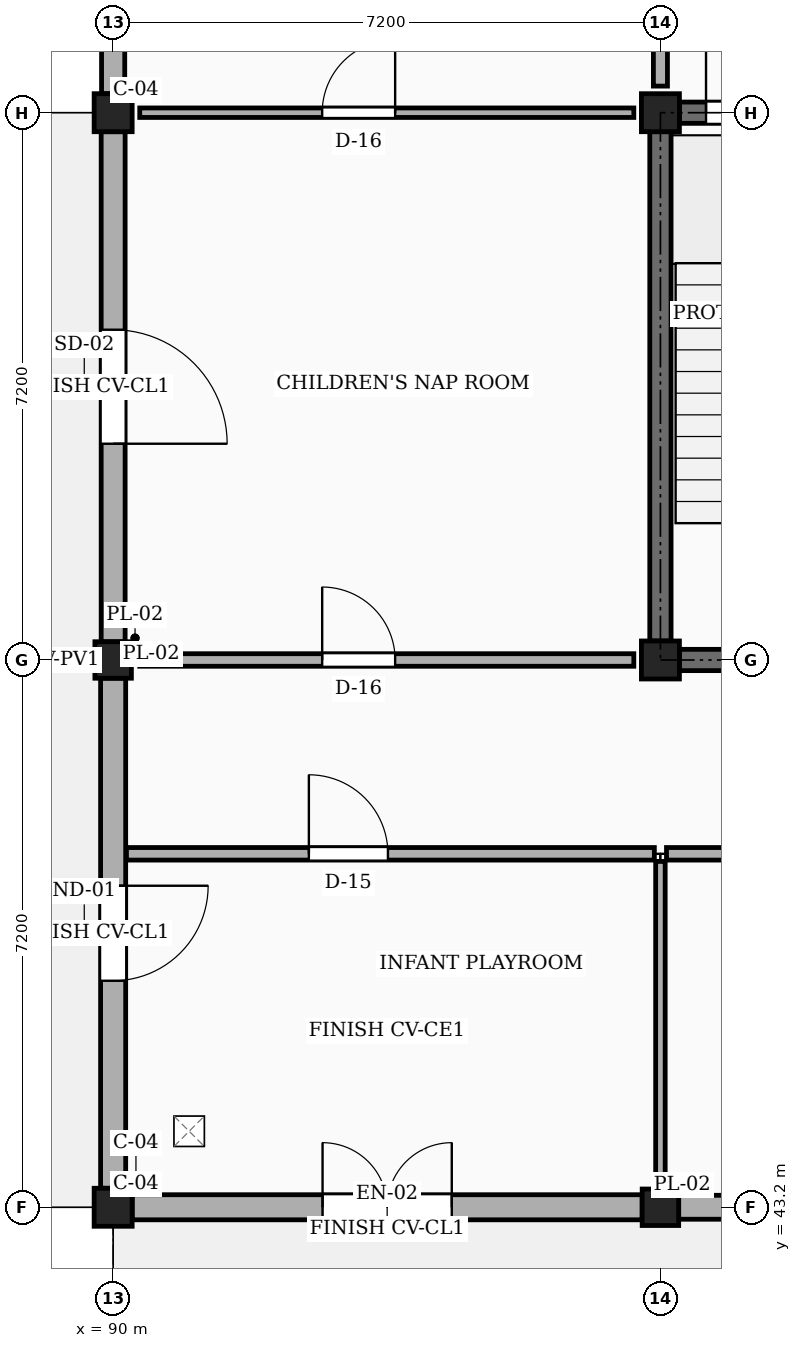
"""IFC4 building model, lengths in metres.
Left out: names, types, materials, properties, quantities, classifications, styles, units other than length and angle.
Written with IfcOpenShell. Run it as: python <this file> out.ifc"""

import sys

from ifc_helpers import new_model, si_unit, direction, frame, frame_2d, origin, origin_2d, place, context, subcontext, project, spatial, rectangle, extrude, element, fill, save


model = new_model("IFC4")
c1 = context("Model", 3, precision=1e-05, world=origin(), true_north=direction((0.0, 1.0)))
c2 = subcontext(c1, "Body", "Model", "MODEL_VIEW")
j1 = project(units=[si_unit("LENGTHUNIT", "METRE"), si_unit("PLANEANGLEUNIT", "RADIAN")], contexts=[c1])
p1 = place(None, origin())
s1 = spatial("IfcSite", under=j1, at=p1, CompositionType="ELEMENT")
p2 = place(p1, origin())
s2 = spatial("IfcBuilding", under=s1, at=p2, CompositionType="ELEMENT")
p3 = place(p2, origin())
s3 = spatial("IfcBuildingStorey", under=s2, at=p3, CompositionType="ELEMENT", Elevation=0.0)
p4 = place(p3, frame((90.0, 43.2, 0.0), z_axis=(0.0, 0.0, 1.0), x_axis=(1.0, 0.0, 0.0)))
e1 = element("IfcColumn", 1, at=p4, inside=s3, PredefinedType="COLUMN", context=c2, shape_type="SweptSolid", body=[
    extrude(rectangle(XDim=0.5, YDim=0.5, at=origin_2d()), origin(), (0.0, 0.0, 1.0), 4.5),
])
p5 = place(p3, frame((90.0, 50.4, 0.0), z_axis=(0.0, 0.0, 1.0), x_axis=(1.0, 0.0, 0.0)))
e2 = element("IfcColumn", 2, at=p5, inside=s3, PredefinedType="PILASTER", context=c2, shape_type="SweptSolid", body=[
    extrude(rectangle(XDim=0.48, YDim=0.48, at=origin_2d()), origin(), (0.0, 0.0, 1.0), 4.5),
])
p6 = place(p3, frame((90.0, 57.6, 0.0), z_axis=(0.0, 0.0, 1.0), x_axis=(1.0, 0.0, 0.0)))
e3 = element("IfcColumn", 3, at=p6, inside=s3, PredefinedType="COLUMN", context=c2, shape_type="SweptSolid", body=[
    extrude(rectangle(XDim=0.5, YDim=0.5, at=origin_2d()), origin(), (0.0, 0.0, 1.0), 4.5),
])
p7 = place(p3, frame((97.2, 43.2, 0.0), z_axis=(0.0, 0.0, 1.0), x_axis=(1.0, 0.0, 0.0)))
e4 = element("IfcColumn", 4, at=p7, inside=s3, PredefinedType="PILASTER", context=c2, shape_type="SweptSolid", body=[
    extrude(rectangle(XDim=0.48, YDim=0.48, at=origin_2d()), origin(), (0.0, 0.0, 1.0), 4.5),
])
for number, where, z_axis, x_axis in (
    (5, (97.2, 50.4, 0.0), (0.0, 0.0, 1.0), (1.0, 0.0, 0.0)),
    (6, (97.2, 57.6, 0.0), (0.0, 0.0, 1.0), (1.0, 0.0, 0.0)),
):
    element("IfcColumn", number, at=place(p3, frame(where, z_axis=z_axis, x_axis=x_axis)), inside=s3, PredefinedType="COLUMN", context=c2, shape_type="SweptSolid", body=[
        extrude(rectangle(XDim=0.5, YDim=0.5, at=origin_2d()), origin(), (0.0, 0.0, 1.0), 4.5),
    ])
p8 = place(p3, frame((90.25, 43.2, 0.0), z_axis=(0.0, 0.0, 1.0), x_axis=(1.0, 0.0, 0.0)))
e7 = element("IfcWall", 7, at=p8, inside=s3, PredefinedType="SOLIDWALL", context=c2, shape_type="SweptSolid", body=[
    extrude(rectangle(XDim=6.71, YDim=0.33, at=frame_2d((3.355, 0.0))), origin(), (0.0, 0.0, 1.0), 3.83),
])
p9 = place(p8, frame((2.505, 0.0, 0.0)))
e8 = element("IfcOpeningElement", 8, at=p9, cuts=e7, PredefinedType="OPENING", context=c2, shape_type="SweptSolid", body=[
    extrude(rectangle(XDim=1.7, YDim=2.25, at=frame_2d((0.85, 1.125))), frame((0.0, 0.175, 0.0), z_axis=(0.0, -1.0, 0.0), x_axis=(1.0, 0.0, 0.0)), (0.0, 0.0, 1.0), 0.35),
])
p10 = place(p3, frame((97.44, 43.2, 0.0), z_axis=(0.0, 0.0, 1.0), x_axis=(1.0, 0.0, 0.0)))
e9 = element("IfcWall", 9, at=p10, inside=s3, PredefinedType="SOLIDWALL", context=c2, shape_type="SweptSolid", body=[
    extrude(rectangle(XDim=6.71, YDim=0.315, at=frame_2d((3.355, 0.0))), origin(), (0.0, 0.0, 1.0), 3.83),
])
p11 = place(p10, frame((2.655, 0.0, 0.0)))
e10 = element("IfcOpeningElement", 10, at=p11, cuts=e9, PredefinedType="OPENING", context=c2, shape_type="SweptSolid", body=[
    extrude(rectangle(XDim=1.4, YDim=2.2, at=frame_2d((0.7, 1.1))), frame((0.0, 0.167, 0.0), z_axis=(0.0, -1.0, 0.0), x_axis=(1.0, 0.0, 0.0)), (0.0, 0.0, 1.0), 0.335),
])
p12 = place(p3, frame((90.0, 64.55, 0.0), z_axis=(0.0, 0.0, 1.0), x_axis=(0.0, -1.0, 0.0)))
e11 = element("IfcWall", 11, at=p12, inside=s3, PredefinedType="SOLIDWALL", context=c2, shape_type="SweptSolid", body=[
    extrude(rectangle(XDim=6.7, YDim=0.305, at=frame_2d((3.35, 0.0))), origin(), (0.0, 0.0, 1.0), 3.83),
])
p13 = place(p12, frame((2.3, 0.0, 0.85)))
e12 = element("IfcOpeningElement", 12, at=p13, cuts=e11, PredefinedType="OPENING", context=c2, shape_type="SweptSolid", body=[
    extrude(rectangle(XDim=2.1, YDim=2.1, at=frame_2d((1.05, 1.05))), frame((0.0, 0.163, 0.0), z_axis=(0.0, -1.0, 0.0), x_axis=(1.0, 0.0, 0.0)), (0.0, 0.0, 1.0), 0.325),
])
p14 = place(p3, frame((90.0, 57.35, 0.0), z_axis=(0.0, 0.0, 1.0), x_axis=(0.0, -1.0, 0.0)))
e13 = element("IfcWall", 13, at=p14, inside=s3, PredefinedType="SOLIDWALL", context=c2, shape_type="SweptSolid", body=[
    extrude(rectangle(XDim=6.71, YDim=0.315, at=frame_2d((3.355, 0.0))), origin(), (0.0, 0.0, 1.0), 3.83),
])
p15 = place(p14, frame((2.605, 0.0, 0.0)))
e14 = element("IfcOpeningElement", 14, at=p15, cuts=e13, PredefinedType="OPENING", context=c2, shape_type="SweptSolid", body=[
    extrude(rectangle(XDim=1.5, YDim=2.2, at=frame_2d((0.75, 1.1))), frame((0.0, 0.167, 0.0), z_axis=(0.0, -1.0, 0.0), x_axis=(1.0, 0.0, 0.0)), (0.0, 0.0, 1.0), 0.335),
])
p16 = place(p3, frame((90.0, 50.16, 0.0), z_axis=(0.0, 0.0, 1.0), x_axis=(0.0, -1.0, 0.0)))
e15 = element("IfcWall", 15, at=p16, inside=s3, PredefinedType="SOLIDWALL", context=c2, shape_type="SweptSolid", body=[
    extrude(rectangle(XDim=6.71, YDim=0.33, at=frame_2d((3.355, 0.0))), origin(), (0.0, 0.0, 1.0), 3.83),
])
p17 = place(p16, frame((2.73, 0.0, 0.0)))
e16 = element("IfcOpeningElement", 16, at=p17, cuts=e15, PredefinedType="OPENING", context=c2, shape_type="SweptSolid", body=[
    extrude(rectangle(XDim=1.25, YDim=2.15, at=frame_2d((0.625, 1.075))), frame((0.0, 0.175, 0.0), z_axis=(0.0, -1.0, 0.0), x_axis=(1.0, 0.0, 0.0)), (0.0, 0.0, 1.0), 0.35),
])
p18 = place(p3, frame((97.2, 50.65, 0.0), z_axis=(0.0, 0.0, 1.0), x_axis=(0.0, 1.0, 0.0)))
e17 = element("IfcWall", 17, at=p18, inside=s3, PredefinedType="SHEAR", context=c2, shape_type="SweptSolid", body=[
    extrude(rectangle(XDim=6.7, YDim=0.28, at=frame_2d((3.35, 0.0))), origin(), (0.0, 0.0, 1.0), 4.26),
])
p19 = place(p3, frame((97.45, 57.6, 0.0), z_axis=(0.0, 0.0, 1.0), x_axis=(1.0, 0.0, 0.0)))
e18 = element("IfcWall", 18, at=p19, inside=s3, PredefinedType="SHEAR", context=c2, shape_type="SweptSolid", body=[
    extrude(rectangle(XDim=6.7, YDim=0.28, at=frame_2d((3.35, 0.0))), origin(), (0.0, 0.0, 1.0), 4.26),
])
p20 = place(p19, frame((0.35, 0.0, 0.0)))
e19 = element("IfcOpeningElement", 19, at=p20, cuts=e18, PredefinedType="OPENING", context=c2, shape_type="SweptSolid", body=[
    extrude(rectangle(XDim=1.05, YDim=2.15, at=frame_2d((0.525, 1.075))), frame((0.0, 0.15, 0.0), z_axis=(0.0, -1.0, 0.0), x_axis=(1.0, 0.0, 0.0)), (0.0, 0.0, 1.0), 0.3),
])
p21 = place(p3, frame((97.45, 50.4, 0.0), z_axis=(0.0, 0.0, 1.0), x_axis=(1.0, 0.0, 0.0)))
e20 = element("IfcWall", 20, at=p21, inside=s3, PredefinedType="SHEAR", context=c2, shape_type="SweptSolid", body=[
    extrude(rectangle(XDim=6.7, YDim=0.28, at=frame_2d((3.35, 0.0))), origin(), (0.0, 0.0, 1.0), 4.26),
])
p22 = place(p21, frame((4.5, 0.0, 0.0)))
e21 = element("IfcOpeningElement", 21, at=p22, cuts=e20, PredefinedType="OPENING", context=c2, shape_type="SweptSolid", body=[
    extrude(rectangle(XDim=1.1, YDim=2.15, at=frame_2d((0.55, 1.075))), frame((0.0, 0.15, 0.0), z_axis=(0.0, -1.0, 0.0), x_axis=(1.0, 0.0, 0.0)), (0.0, 0.0, 1.0), 0.3),
])
p23 = place(p3, frame((90.175, 47.85, 0.0), z_axis=(0.0, 0.0, 1.0), x_axis=(1.0, 0.0, 0.0)))
e22 = element("IfcWall", 22, at=p23, inside=s3, PredefinedType="PARTITIONING", context=c2, shape_type="SweptSolid", body=[
    extrude(rectangle(XDim=6.945, YDim=0.165, at=frame_2d((3.473, 0.0))), origin(), (0.0, 0.0, 1.0), 3.41),
])
p24 = place(p23, frame((2.4, 0.0, 0.0)))
e23 = element("IfcOpeningElement", 23, at=p24, cuts=e22, PredefinedType="OPENING", context=c2, shape_type="SweptSolid", body=[
    extrude(rectangle(XDim=1.04, YDim=2.12, at=frame_2d((0.52, 1.06))), frame((0.0, 0.093, 0.0), z_axis=(0.0, -1.0, 0.0), x_axis=(1.0, 0.0, 0.0)), (0.0, 0.0, 1.0), 0.185),
])
p25 = place(p3, frame((97.28, 47.85, 0.0), z_axis=(0.0, 0.0, 1.0), x_axis=(1.0, 0.0, 0.0)))
e24 = element("IfcWall", 24, at=p25, inside=s3, PredefinedType="PARTITIONING", context=c2, shape_type="SweptSolid", body=[
    extrude(rectangle(XDim=7.04, YDim=0.165, at=frame_2d((3.52, 0.0))), origin(), (0.0, 0.0, 1.0), 3.41),
])
p26 = place(p25, frame((2.4, 0.0, 0.0)))
e25 = element("IfcOpeningElement", 25, at=p26, cuts=e24, PredefinedType="OPENING", context=c2, shape_type="SweptSolid", body=[
    extrude(rectangle(XDim=1.04, YDim=2.12, at=frame_2d((0.52, 1.06))), frame((0.0, 0.093, 0.0), z_axis=(0.0, -1.0, 0.0), x_axis=(1.0, 0.0, 0.0)), (0.0, 0.0, 1.0), 0.185),
])
p27 = place(p3, frame((90.35, 50.4, 0.0), z_axis=(0.0, 0.0, 1.0), x_axis=(1.0, 0.0, 0.0)))
e26 = element("IfcWall", 26, at=p27, inside=s3, PredefinedType="PARTITIONING", context=c2, shape_type="SweptSolid", body=[
    extrude(rectangle(XDim=6.5, YDim=0.165, at=frame_2d((3.25, 0.0))), origin(), (0.0, 0.0, 1.0), 3.41),
])
p28 = place(p27, frame((2.4, 0.0, 0.0)))
e27 = element("IfcOpeningElement", 27, at=p28, cuts=e26, PredefinedType="OPENING", context=c2, shape_type="SweptSolid", body=[
    extrude(rectangle(XDim=0.96, YDim=2.1, at=frame_2d((0.48, 1.05))), frame((0.0, 0.093, 0.0), z_axis=(0.0, -1.0, 0.0), x_axis=(1.0, 0.0, 0.0)), (0.0, 0.0, 1.0), 0.185),
])
p29 = place(p3, frame((97.2, 43.55, 0.0), z_axis=(0.0, 0.0, 1.0), x_axis=(0.0, 1.0, 0.0)))
e28 = element("IfcWall", 28, at=p29, inside=s3, PredefinedType="PARTITIONING", context=c2, shape_type="SweptSolid", body=[
    extrude(rectangle(XDim=4.2, YDim=0.125, at=frame_2d((2.1, 0.0))), origin(), (0.0, 0.0, 1.0), 3.41),
])
p30 = place(p3, frame((90.35, 57.6, 0.0), z_axis=(0.0, 0.0, 1.0), x_axis=(1.0, 0.0, 0.0)))
e29 = element("IfcWall", 29, at=p30, inside=s3, PredefinedType="PARTITIONING", context=c2, shape_type="SweptSolid", body=[
    extrude(rectangle(XDim=6.5, YDim=0.125, at=frame_2d((3.25, 0.0))), origin(), (0.0, 0.0, 1.0), 3.41),
])
p31 = place(p30, frame((2.4, 0.0, 0.0)))
e30 = element("IfcOpeningElement", 30, at=p31, cuts=e29, PredefinedType="OPENING", context=c2, shape_type="SweptSolid", body=[
    extrude(rectangle(XDim=0.96, YDim=2.1, at=frame_2d((0.48, 1.05))), frame((0.0, 0.073, 0.0), z_axis=(0.0, -1.0, 0.0), x_axis=(1.0, 0.0, 0.0)), (0.0, 0.0, 1.0), 0.145),
])
p32 = place(p3, frame((97.2, 57.95, 0.0), z_axis=(0.0, 0.0, 1.0), x_axis=(0.0, 1.0, 0.0)))
e31 = element("IfcWall", 31, at=p32, inside=s3, PredefinedType="PARTITIONING", context=c2, shape_type="SweptSolid", body=[
    extrude(rectangle(XDim=6.5, YDim=0.185, at=frame_2d((3.25, 0.0))), origin(), (0.0, 0.0, 1.0), 3.41),
])
p33 = place(p9, frame((1.7, 0.0, 0.0), z_axis=(0.0, 0.0, 1.0), x_axis=(-1.0, 0.0, 0.0)))
e32 = element("IfcDoor", 32, at=p33, inside=s3, OperationType="DOUBLE_DOOR_SINGLE_SWING", PredefinedType="DOOR", context=c2, shape_type="SweptSolid", body=[
    extrude(rectangle(XDim=1.7, YDim=2.25, at=frame_2d((0.85, 1.125))), frame((0.0, 0.025, 0.0), z_axis=(0.0, -1.0, 0.0), x_axis=(1.0, 0.0, 0.0)), (0.0, 0.0, 1.0), 0.05),
])
fill(e8, e32)
p34 = place(p15, frame((1.5, 0.0, 0.0), z_axis=(0.0, 0.0, 1.0), x_axis=(-1.0, 0.0, 0.0)))
e33 = element("IfcDoor", 33, at=p34, inside=s3, OperationType="SINGLE_SWING_RIGHT", PredefinedType="DOOR", context=c2, shape_type="SweptSolid", body=[
    extrude(rectangle(XDim=1.5, YDim=2.2, at=frame_2d((0.75, 1.1))), frame((0.0, 0.025, 0.0), z_axis=(0.0, -1.0, 0.0), x_axis=(1.0, 0.0, 0.0)), (0.0, 0.0, 1.0), 0.05),
])
fill(e14, e33)
p35 = place(p17, frame((1.25, 0.0, 0.0), z_axis=(0.0, 0.0, 1.0), x_axis=(-1.0, 0.0, 0.0)))
e34 = element("IfcDoor", 34, at=p35, inside=s3, OperationType="SINGLE_SWING_LEFT", PredefinedType="DOOR", context=c2, shape_type="SweptSolid", body=[
    extrude(rectangle(XDim=1.25, YDim=2.15, at=frame_2d((0.625, 1.075))), frame((0.0, 0.025, 0.0), z_axis=(0.0, -1.0, 0.0), x_axis=(1.0, 0.0, 0.0)), (0.0, 0.0, 1.0), 0.05),
])
fill(e16, e34)
p36 = place(p24, origin())
e35 = element("IfcDoor", 35, at=p36, inside=s3, OperationType="SINGLE_SWING_LEFT", PredefinedType="DOOR", context=c2, shape_type="SweptSolid", body=[
    extrude(rectangle(XDim=1.04, YDim=2.12, at=frame_2d((0.52, 1.06))), frame((0.0, 0.025, 0.0), z_axis=(0.0, -1.0, 0.0), x_axis=(1.0, 0.0, 0.0)), (0.0, 0.0, 1.0), 0.05),
])
fill(e23, e35)
p37 = place(p28, origin())
e36 = element("IfcDoor", 36, at=p37, inside=s3, OperationType="SINGLE_SWING_LEFT", PredefinedType="DOOR", context=c2, shape_type="SweptSolid", body=[
    extrude(rectangle(XDim=0.96, YDim=2.1, at=frame_2d((0.48, 1.05))), frame((0.0, 0.025, 0.0), z_axis=(0.0, -1.0, 0.0), x_axis=(1.0, 0.0, 0.0)), (0.0, 0.0, 1.0), 0.05),
])
fill(e27, e36)
p38 = place(p31, origin())
e37 = element("IfcDoor", 37, at=p38, inside=s3, OperationType="SINGLE_SWING_RIGHT", PredefinedType="DOOR", context=c2, shape_type="SweptSolid", body=[
    extrude(rectangle(XDim=0.96, YDim=2.1, at=frame_2d((0.48, 1.05))), frame((0.0, 0.025, 0.0), z_axis=(0.0, -1.0, 0.0), x_axis=(1.0, 0.0, 0.0)), (0.0, 0.0, 1.0), 0.05),
])
fill(e30, e37)
p39 = place(p20, origin())
e38 = element("IfcDoor", 38, at=p39, inside=s3, OperationType="SINGLE_SWING_LEFT", PredefinedType="DOOR", context=c2, shape_type="SweptSolid", body=[
    extrude(rectangle(XDim=1.05, YDim=2.15, at=frame_2d((0.525, 1.075))), frame((0.0, 0.025, 0.0), z_axis=(0.0, -1.0, 0.0), x_axis=(1.0, 0.0, 0.0)), (0.0, 0.0, 1.0), 0.05),
])
fill(e19, e38)
save(model, sys.argv[1])
